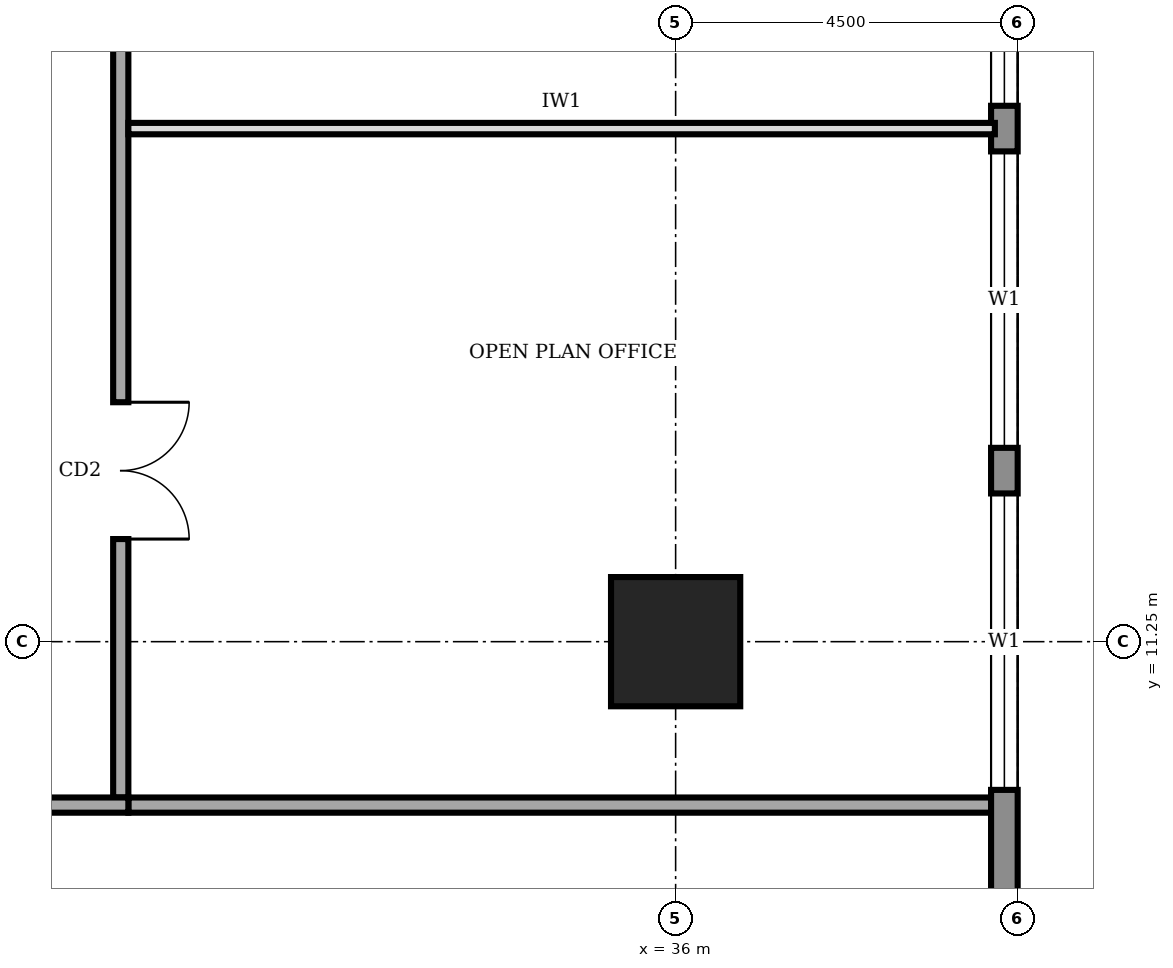
"""IFC4 building model, lengths in metres.
Left out: names, types, materials, properties, quantities, classifications, styles, units other than length and angle.
Written with IfcOpenShell. Run it as: python <this file> out.ifc"""

import sys

from ifc_helpers import new_model, si_unit, direction, frame, frame_2d, origin, origin_2d, place, context, subcontext, project, spatial, rectangle, extrude, element, fill, save


model = new_model("IFC4")
c1 = context("Model", 3, precision=1e-05, world=origin(), true_north=direction((0.0, 1.0)))
c2 = subcontext(c1, "Body", "Model", "MODEL_VIEW")
j1 = project(units=[si_unit("LENGTHUNIT", "METRE"), si_unit("PLANEANGLEUNIT", "RADIAN")], contexts=[c1])
p1 = place(None, origin())
s1 = spatial("IfcSite", under=j1, at=p1, CompositionType="ELEMENT")
p2 = place(p1, origin())
s2 = spatial("IfcBuilding", under=s1, at=p2, CompositionType="ELEMENT")
p3 = place(p2, frame((0.0, 0.0, 281.0)))
s3 = spatial("IfcBuildingStorey", under=s2, at=p3, CompositionType="ELEMENT", Elevation=281.0)
p4 = place(p3, frame((36.0, 11.25, 0.0), z_axis=(0.0, 0.0, 1.0), x_axis=(1.0, 0.0, 0.0)))
e1 = element("IfcColumn", 1, at=p4, inside=s3, PredefinedType="COLUMN", context=c2, shape_type="SweptSolid", body=[
    extrude(rectangle(XDim=1.7, YDim=1.7, at=origin_2d()), origin(), (0.0, 0.0, 1.0), 4.0),
])
p5 = place(p3, frame((40.325, 4.52, 0.0), z_axis=(0.0, 0.0, 1.0), x_axis=(0.0, 1.0, 0.0)))
e2 = element("IfcWall", 2, at=p5, inside=s3, PredefinedType="STANDARD", context=c2, shape_type="SweptSolid", body=[
    extrude(rectangle(XDim=31.46, YDim=0.35, at=frame_2d((15.73, 0.0))), origin(), (0.0, 0.0, 1.0), 3.75),
])
p6 = place(p5, frame((4.78, 0.0, 0.9)))
e3 = element("IfcOpeningElement", 3, at=p6, cuts=e2, PredefinedType="OPENING", context=c2, shape_type="SweptSolid", body=[
    extrude(rectangle(XDim=3.9, YDim=2.2, at=frame_2d((1.95, 1.1))), frame((0.0, 0.185, 0.0), z_axis=(0.0, -1.0, 0.0), x_axis=(1.0, 0.0, 0.0)), (0.0, 0.0, 1.0), 0.37),
])
p7 = place(p5, frame((9.28, 0.0, 0.9)))
e4 = element("IfcOpeningElement", 4, at=p7, cuts=e2, PredefinedType="OPENING", context=c2, shape_type="SweptSolid", body=[
    extrude(rectangle(XDim=3.9, YDim=2.2, at=frame_2d((1.95, 1.1))), frame((0.0, 0.185, 0.0), z_axis=(0.0, -1.0, 0.0), x_axis=(1.0, 0.0, 0.0)), (0.0, 0.0, 1.0), 0.37),
])
p8 = place(p5, frame((13.78, 0.0, 0.9)))
e5 = element("IfcOpeningElement", 5, at=p8, cuts=e2, PredefinedType="OPENING", context=c2, shape_type="SweptSolid", body=[
    extrude(rectangle(XDim=3.9, YDim=2.2, at=frame_2d((1.95, 1.1))), frame((0.0, 0.185, 0.0), z_axis=(0.0, -1.0, 0.0), x_axis=(1.0, 0.0, 0.0)), (0.0, 0.0, 1.0), 0.37),
])
p9 = place(p5, frame((18.28, 0.0, 0.9)))
e6 = element("IfcOpeningElement", 6, at=p9, cuts=e2, PredefinedType="OPENING", context=c2, shape_type="SweptSolid", body=[
    extrude(rectangle(XDim=3.9, YDim=2.2, at=frame_2d((1.95, 1.1))), frame((0.0, 0.185, 0.0), z_axis=(0.0, -1.0, 0.0), x_axis=(1.0, 0.0, 0.0)), (0.0, 0.0, 1.0), 0.37),
])
p10 = place(p5, frame((22.78, 0.0, 0.9)))
e7 = element("IfcOpeningElement", 7, at=p10, cuts=e2, PredefinedType="OPENING", context=c2, shape_type="SweptSolid", body=[
    extrude(rectangle(XDim=3.9, YDim=2.2, at=frame_2d((1.95, 1.1))), frame((0.0, 0.185, 0.0), z_axis=(0.0, -1.0, 0.0), x_axis=(1.0, 0.0, 0.0)), (0.0, 0.0, 1.0), 0.37),
])
p11 = place(p5, frame((27.21, 0.0, 0.9)))
e8 = element("IfcOpeningElement", 8, at=p11, cuts=e2, PredefinedType="OPENING", context=c2, shape_type="SweptSolid", body=[
    extrude(rectangle(XDim=3.9, YDim=2.2, at=frame_2d((1.95, 1.1))), frame((0.0, 0.185, 0.0), z_axis=(0.0, -1.0, 0.0), x_axis=(1.0, 0.0, 0.0)), (0.0, 0.0, 1.0), 0.37),
])
p12 = place(p3, frame((11.9, 9.1, 0.0), z_axis=(0.0, 0.0, 1.0), x_axis=(1.0, 0.0, 0.0)))
e9 = element("IfcWall", 9, at=p12, inside=s3, PredefinedType="SOLIDWALL", context=c2, shape_type="SweptSolid", body=[
    extrude(rectangle(XDim=16.9, YDim=0.2, at=frame_2d((8.45, 0.0))), origin(), (0.0, 0.0, 1.0), 3.75),
])
p13 = place(p12, frame((0.275, 0.0, 0.0)))
e10 = element("IfcOpeningElement", 10, at=p13, cuts=e9, PredefinedType="OPENING", context=c2, shape_type="SweptSolid", body=[
    extrude(rectangle(XDim=1.0, YDim=2.1, at=frame_2d((0.5, 1.05))), frame((0.0, 0.11, 0.0), z_axis=(0.0, -1.0, 0.0), x_axis=(1.0, 0.0, 0.0)), (0.0, 0.0, 1.0), 0.22),
])
p14 = place(p12, frame((8.35, 0.0, 0.0)))
e11 = element("IfcOpeningElement", 11, at=p14, cuts=e9, PredefinedType="OPENING", context=c2, shape_type="SweptSolid", body=[
    extrude(rectangle(XDim=1.8, YDim=2.1, at=frame_2d((0.9, 1.05))), frame((0.0, 0.11, 0.0), z_axis=(0.0, -1.0, 0.0), x_axis=(1.0, 0.0, 0.0)), (0.0, 0.0, 1.0), 0.22),
])
p15 = place(p3, frame((28.7, 9.2, 0.0), z_axis=(0.0, 0.0, 1.0), x_axis=(0.0, 1.0, 0.0)))
e12 = element("IfcWall", 12, at=p15, inside=s3, PredefinedType="SOLIDWALL", context=c2, shape_type="SweptSolid", body=[
    extrude(rectangle(XDim=23.8, YDim=0.2, at=frame_2d((11.9, 0.0))), origin(), (0.0, 0.0, 1.0), 3.75),
])
p16 = place(p15, frame((3.4, 0.0, 0.0)))
e13 = element("IfcOpeningElement", 13, at=p16, cuts=e12, PredefinedType="OPENING", context=c2, shape_type="SweptSolid", body=[
    extrude(rectangle(XDim=1.8, YDim=2.1, at=frame_2d((0.9, 1.05))), frame((0.0, 0.11, 0.0), z_axis=(0.0, -1.0, 0.0), x_axis=(1.0, 0.0, 0.0)), (0.0, 0.0, 1.0), 0.22),
])
p17 = place(p15, frame((10.55, 0.0, 0.0)))
e14 = element("IfcOpeningElement", 14, at=p17, cuts=e12, PredefinedType="OPENING", context=c2, shape_type="SweptSolid", body=[
    extrude(rectangle(XDim=1.0, YDim=2.1, at=frame_2d((0.5, 1.05))), frame((0.0, 0.11, 0.0), z_axis=(0.0, -1.0, 0.0), x_axis=(1.0, 0.0, 0.0)), (0.0, 0.0, 1.0), 0.22),
])
p18 = place(p15, frame((17.65, 0.0, 0.0)))
e15 = element("IfcOpeningElement", 15, at=p18, cuts=e12, PredefinedType="OPENING", context=c2, shape_type="SweptSolid", body=[
    extrude(rectangle(XDim=1.8, YDim=2.1, at=frame_2d((0.9, 1.05))), frame((0.0, 0.11, 0.0), z_axis=(0.0, -1.0, 0.0), x_axis=(1.0, 0.0, 0.0)), (0.0, 0.0, 1.0), 0.22),
])
p19 = place(p3, frame((28.8, 9.1, 0.0), z_axis=(0.0, 0.0, 1.0), x_axis=(1.0, 0.0, 0.0)))
e16 = element("IfcWall", 16, at=p19, inside=s3, PredefinedType="SOLIDWALL", context=c2, shape_type="SweptSolid", body=[
    extrude(rectangle(XDim=11.4, YDim=0.2, at=frame_2d((5.7, 0.0))), origin(), (0.0, 0.0, 1.0), 3.75),
])
p20 = place(p3, frame((28.8, 18.0, 0.0), z_axis=(0.0, 0.0, 1.0), x_axis=(1.0, 0.0, 0.0)))
e17 = element("IfcWall", 17, at=p20, inside=s3, PredefinedType="PARTITIONING", context=c2, shape_type="SweptSolid", body=[
    extrude(rectangle(XDim=11.4, YDim=0.15, at=frame_2d((5.7, 0.0))), origin(), (0.0, 0.0, 1.0), 3.75),
])
p21 = place(p6, origin())
e18 = element("IfcWindow", 18, at=p21, inside=s3, PartitioningType="SINGLE_PANEL", PredefinedType="WINDOW", context=c2, shape_type="SweptSolid", body=[
    extrude(rectangle(XDim=3.9, YDim=2.2, at=frame_2d((1.95, 1.1))), frame((0.0, 0.03, 0.0), z_axis=(0.0, -1.0, 0.0), x_axis=(1.0, 0.0, 0.0)), (0.0, 0.0, 1.0), 0.06),
])
fill(e3, e18)
p22 = place(p7, origin())
e19 = element("IfcWindow", 19, at=p22, inside=s3, PartitioningType="SINGLE_PANEL", PredefinedType="WINDOW", context=c2, shape_type="SweptSolid", body=[
    extrude(rectangle(XDim=3.9, YDim=2.2, at=frame_2d((1.95, 1.1))), frame((0.0, 0.03, 0.0), z_axis=(0.0, -1.0, 0.0), x_axis=(1.0, 0.0, 0.0)), (0.0, 0.0, 1.0), 0.06),
])
fill(e4, e19)
p23 = place(p8, origin())
e20 = element("IfcWindow", 20, at=p23, inside=s3, PartitioningType="SINGLE_PANEL", PredefinedType="WINDOW", context=c2, shape_type="SweptSolid", body=[
    extrude(rectangle(XDim=3.9, YDim=2.2, at=frame_2d((1.95, 1.1))), frame((0.0, 0.03, 0.0), z_axis=(0.0, -1.0, 0.0), x_axis=(1.0, 0.0, 0.0)), (0.0, 0.0, 1.0), 0.06),
])
fill(e5, e20)
p24 = place(p16, frame((1.8, 0.0, 0.0), z_axis=(0.0, 0.0, 1.0), x_axis=(-1.0, 0.0, 0.0)))
e21 = element("IfcDoor", 21, at=p24, inside=s3, OperationType="DOUBLE_DOOR_SINGLE_SWING", PredefinedType="DOOR", context=c2, shape_type="SweptSolid", body=[
    extrude(rectangle(XDim=1.8, YDim=2.1, at=frame_2d((0.9, 1.05))), frame((0.0, 0.025, 0.0), z_axis=(0.0, -1.0, 0.0), x_axis=(1.0, 0.0, 0.0)), (0.0, 0.0, 1.0), 0.05),
])
fill(e13, e21)
save(model, sys.argv[1])
